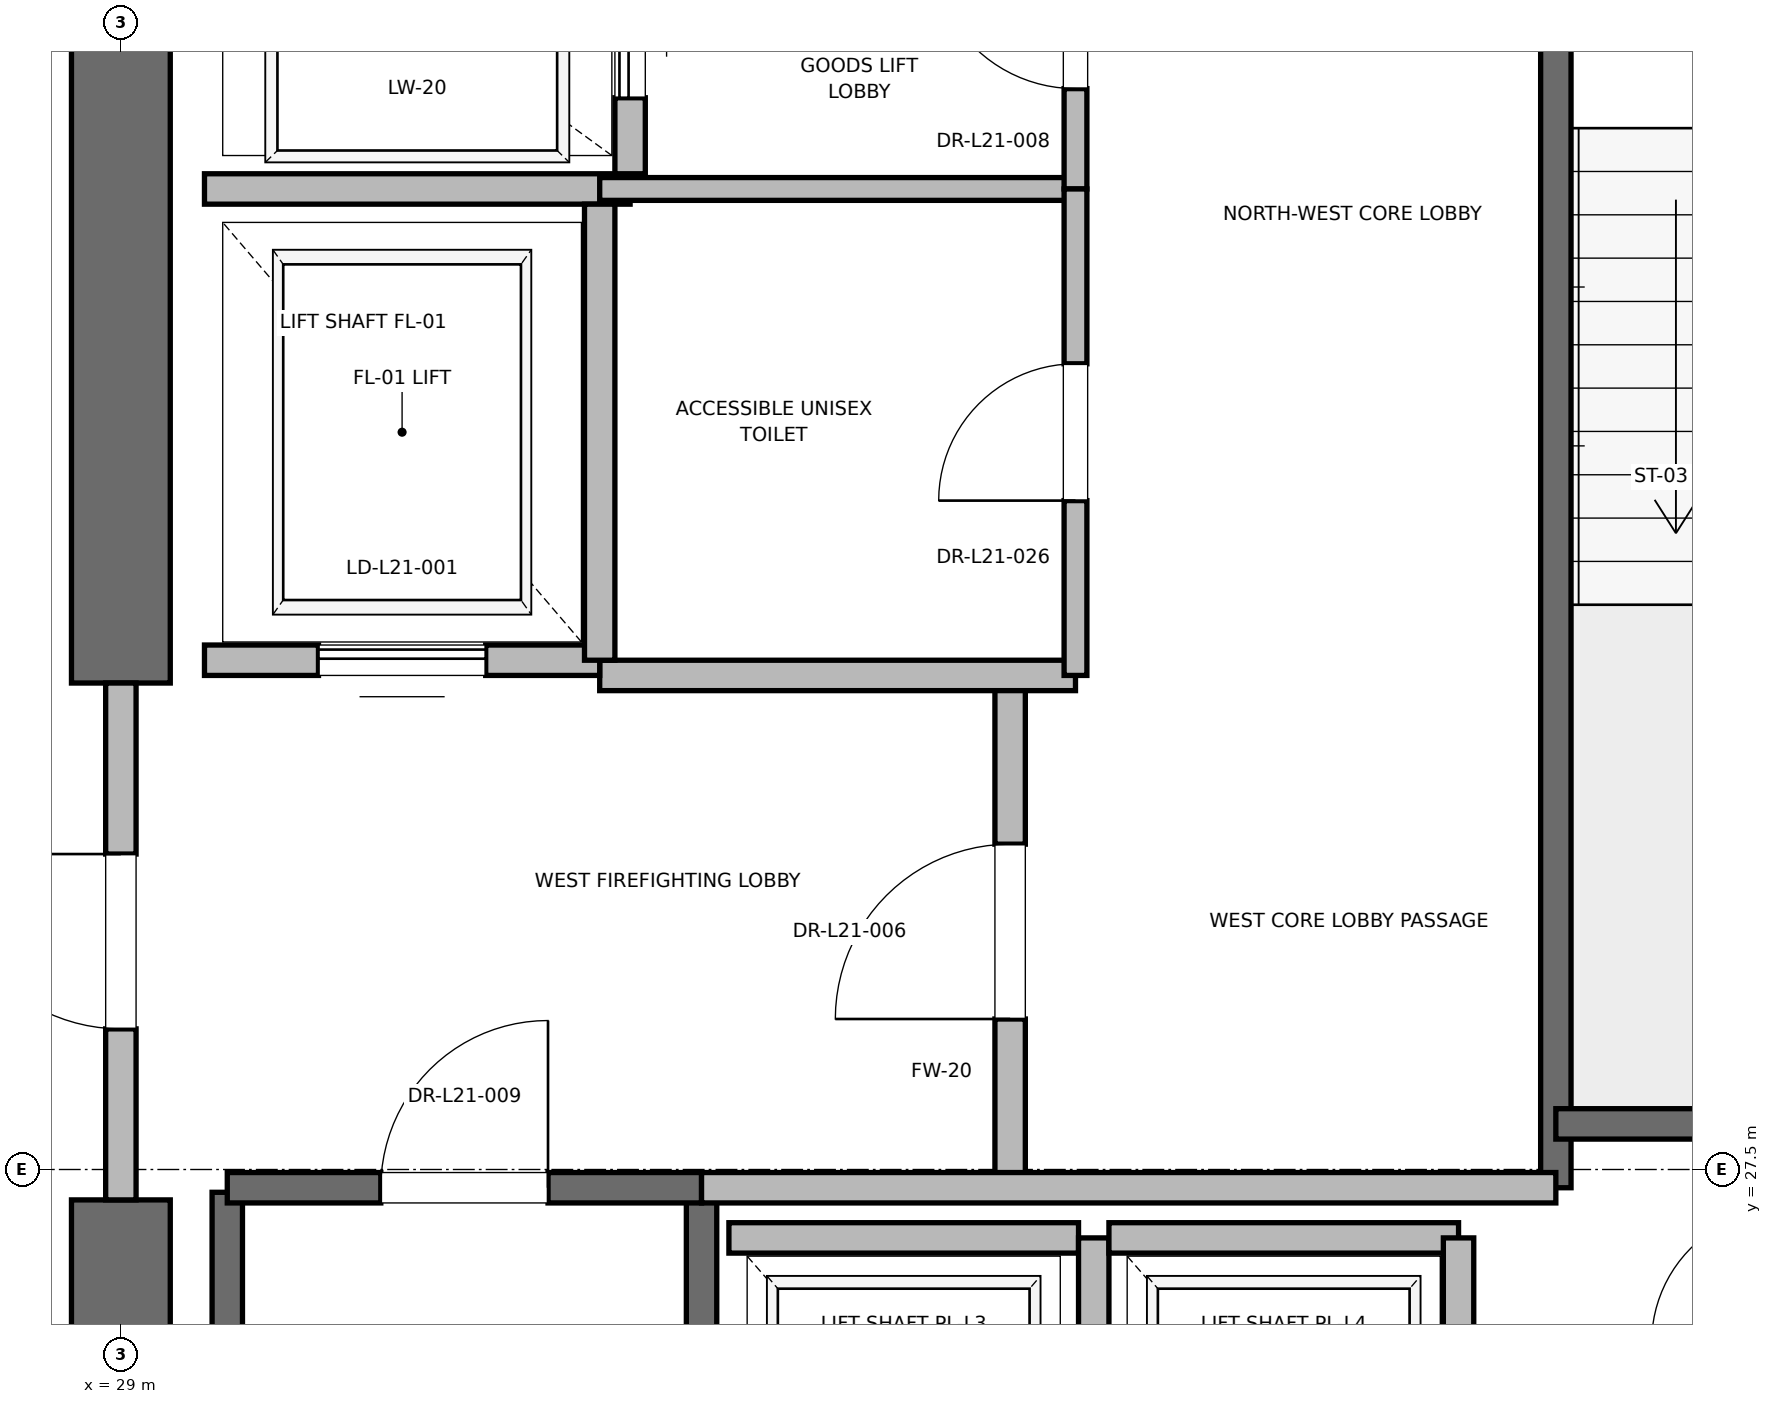
"""IFC4 building model, lengths in metres.
Left out: names, types, materials, properties, quantities, classifications, styles, units other than length and angle.
Written with IfcOpenShell. Run it as: python <this file> out.ifc"""

import sys

from ifc_helpers import new_model, si_unit, direction, frame, frame_2d, origin, place, context, subcontext, project, spatial, rectangle, extrude, element, fill, save


model = new_model("IFC4")
c1 = context("Model", 3, precision=1e-05, world=origin(), true_north=direction((0.0, 1.0)))
c2 = subcontext(c1, "Body", "Model", "MODEL_VIEW")
j1 = project(units=[si_unit("LENGTHUNIT", "METRE"), si_unit("PLANEANGLEUNIT", "RADIAN")], contexts=[c1])
p1 = place(None, origin())
s1 = spatial("IfcSite", under=j1, at=p1, CompositionType="ELEMENT")
p2 = place(p1, origin())
s2 = spatial("IfcBuilding", under=s1, at=p2, CompositionType="ELEMENT")
p3 = place(p2, frame((0.0, 0.0, 91.6)))
s3 = spatial("IfcBuildingStorey", under=s2, at=p3, CompositionType="ELEMENT", Elevation=91.6)
p4 = place(p3, frame((29.0, 18.5, 0.0), z_axis=(0.0, 0.0, 1.0), x_axis=(0.0, 1.0, 0.0)))
e1 = element("IfcWall", 1, at=p4, inside=s3, PredefinedType="SHEAR", context=c2, shape_type="SweptSolid", body=[
    extrude(rectangle(XDim=8.8, YDim=0.65, at=frame_2d((4.4, 0.0))), origin(), (0.0, 0.0, 1.0), 3.76),
])
p5 = place(p3, frame((29.0, 30.7, 0.0), z_axis=(0.0, 0.0, 1.0), x_axis=(0.0, 1.0, 0.0)))
e2 = element("IfcWall", 2, at=p5, inside=s3, PredefinedType="SHEAR", context=c2, shape_type="SweptSolid", body=[
    extrude(rectangle(XDim=5.8, YDim=0.65, at=frame_2d((2.9, 0.0))), origin(), (0.0, 0.0, 1.0), 3.76),
])
p6 = place(p3, frame((29.7, 19.2, 0.0), z_axis=(0.0, 0.0, 1.0), x_axis=(0.0, 1.0, 0.0)))
e3 = element("IfcWall", 3, at=p6, inside=s3, PredefinedType="SOLIDWALL", context=c2, shape_type="SweptSolid", body=[
    extrude(rectangle(XDim=8.15, YDim=0.2, at=frame_2d((4.075, 0.0))), origin(), (0.0, 0.0, 1.0), 3.76),
])
p7 = place(p3, frame((32.82, 18.6, 0.0), z_axis=(0.0, 0.0, 1.0), x_axis=(0.0, 1.0, 0.0)))
e4 = element("IfcWall", 4, at=p7, inside=s3, PredefinedType="SOLIDWALL", context=c2, shape_type="SweptSolid", body=[
    extrude(rectangle(XDim=8.78, YDim=0.2, at=frame_2d((4.39, 0.0))), origin(), (0.0, 0.0, 1.0), 3.76),
])
p8 = place(p3, frame((29.7, 27.38, 0.0), z_axis=(0.0, 0.0, 1.0), x_axis=(1.0, 0.0, 0.0)))
e5 = element("IfcWall", 5, at=p8, inside=s3, PredefinedType="SOLIDWALL", context=c2, shape_type="SweptSolid", body=[
    extrude(rectangle(XDim=3.12, YDim=0.2, at=frame_2d((1.56, 0.0))), origin(), (0.0, 0.0, 1.0), 3.76),
])
p9 = place(p8, frame((1.01, 0.0, 0.0)))
e6 = element("IfcOpeningElement", 6, at=p9, cuts=e5, PredefinedType="OPENING", context=c2, shape_type="SweptSolid", body=[
    extrude(rectangle(XDim=1.1, YDim=2.15, at=frame_2d((0.55, 1.075))), frame((0.0, 0.1, 0.0), z_axis=(0.0, -1.0, 0.0), x_axis=(1.0, 0.0, 0.0)), (0.0, 0.0, 1.0), 0.2),
])
p10 = place(p3, frame((38.44, 27.38, 0.0), z_axis=(0.0, 0.0, 1.0), x_axis=(0.0, 1.0, 0.0)))
e7 = element("IfcWall", 7, at=p10, inside=s3, PredefinedType="SOLIDWALL", context=c2, shape_type="SweptSolid", body=[
    extrude(rectangle(XDim=8.87, YDim=0.2, at=frame_2d((4.435, 0.0))), origin(), (0.0, 0.0, 1.0), 3.76),
])
p11 = place(p3, frame((38.44, 27.8, 0.0), z_axis=(0.0, 0.0, 1.0), x_axis=(1.0, 0.0, 0.0)))
e8 = element("IfcWall", 8, at=p11, inside=s3, PredefinedType="SOLIDWALL", context=c2, shape_type="SweptSolid", body=[
    extrude(rectangle(XDim=3.32, YDim=0.2, at=frame_2d((1.66, 0.0))), origin(), (0.0, 0.0, 1.0), 3.76),
])
p12 = place(p3, frame((34.85, 27.38, 0.0), z_axis=(0.0, 0.0, 1.0), x_axis=(0.0, 1.0, 0.0)))
e9 = element("IfcWall", 9, at=p12, inside=s3, PredefinedType="PARTITIONING", context=c2, shape_type="SweptSolid", body=[
    extrude(rectangle(XDim=3.37, YDim=0.2, at=frame_2d((1.685, 0.0))), origin(), (0.0, 0.0, 1.0), 3.76),
])
p13 = place(p12, frame((1.11, 0.0, 0.0)))
e10 = element("IfcOpeningElement", 10, at=p13, cuts=e9, PredefinedType="OPENING", context=c2, shape_type="SweptSolid", body=[
    extrude(rectangle(XDim=1.15, YDim=2.2, at=frame_2d((0.575, 1.1))), frame((0.0, 0.1, 0.0), z_axis=(0.0, -1.0, 0.0), x_axis=(1.0, 0.0, 0.0)), (0.0, 0.0, 1.0), 0.2),
])
p14 = place(p3, frame((29.0, 27.3, 0.0), z_axis=(0.0, 0.0, 1.0), x_axis=(0.0, 1.0, 0.0)))
e11 = element("IfcWall", 11, at=p14, inside=s3, PredefinedType="PARTITIONING", context=c2, shape_type="SweptSolid", body=[
    extrude(rectangle(XDim=3.4, YDim=0.2, at=frame_2d((1.7, 0.0))), origin(), (0.0, 0.0, 1.0), 2.54),
])
p15 = place(p14, frame((1.125, 0.0, 0.0)))
e12 = element("IfcOpeningElement", 12, at=p15, cuts=e11, PredefinedType="OPENING", context=c2, shape_type="SweptSolid", body=[
    extrude(rectangle(XDim=1.15, YDim=2.2, at=frame_2d((0.575, 1.1))), frame((0.0, 0.1, 0.0), z_axis=(0.0, -1.0, 0.0), x_axis=(1.0, 0.0, 0.0)), (0.0, 0.0, 1.0), 0.2),
])
p16 = place(p3, frame((32.82, 27.38, 0.0), z_axis=(0.0, 0.0, 1.0), x_axis=(1.0, 0.0, 0.0)))
e13 = element("IfcWall", 13, at=p16, inside=s3, PredefinedType="PARTITIONING", context=c2, shape_type="SweptSolid", body=[
    extrude(rectangle(XDim=5.62, YDim=0.2, at=frame_2d((2.81, 0.0))), origin(), (0.0, 0.0, 1.0), 3.76),
])
p17 = place(p3, frame((32.15, 30.75, 0.0), z_axis=(0.0, 0.0, 1.0), x_axis=(1.0, 0.0, 0.0)))
e14 = element("IfcWall", 14, at=p17, inside=s3, PredefinedType="PARTITIONING", context=c2, shape_type="SweptSolid", body=[
    extrude(rectangle(XDim=3.13, YDim=0.2, at=frame_2d((1.565, 0.0))), origin(), (0.0, 0.0, 1.0), 3.76),
])
p18 = place(p3, frame((29.55, 30.85, 0.0), z_axis=(0.0, 0.0, 1.0), x_axis=(1.0, 0.0, 0.0)))
e15 = element("IfcWall", 15, at=p18, inside=s3, PredefinedType="SOLIDWALL", context=c2, shape_type="SweptSolid", body=[
    extrude(rectangle(XDim=2.6, YDim=0.2, at=frame_2d((1.3, 0.0))), origin(), (0.0, 0.0, 1.0), 2.54),
])
p19 = place(p18, frame((0.75, 0.0, 0.0)))
e16 = element("IfcOpeningElement", 16, at=p19, cuts=e15, PredefinedType="OPENING", context=c2, shape_type="SweptSolid", body=[
    extrude(rectangle(XDim=1.1, YDim=2.2, at=frame_2d((0.55, 1.1))), frame((0.0, 0.1, 0.0), z_axis=(0.0, -1.0, 0.0), x_axis=(1.0, 0.0, 0.0)), (0.0, 0.0, 1.0), 0.2),
])
p20 = place(p3, frame((29.55, 33.95, 0.0), z_axis=(0.0, 0.0, 1.0), x_axis=(1.0, 0.0, 0.0)))
e17 = element("IfcWall", 17, at=p20, inside=s3, PredefinedType="SOLIDWALL", context=c2, shape_type="SweptSolid", body=[
    extrude(rectangle(XDim=2.8, YDim=0.2, at=frame_2d((1.4, 0.0))), origin(), (0.0, 0.0, 1.0), 3.76),
])
p21 = place(p3, frame((32.15, 30.85, 0.0), z_axis=(0.0, 0.0, 1.0), x_axis=(0.0, 1.0, 0.0)))
e18 = element("IfcWall", 18, at=p21, inside=s3, PredefinedType="SOLIDWALL", context=c2, shape_type="SweptSolid", body=[
    extrude(rectangle(XDim=3.0, YDim=0.2, at=frame_2d((1.5, 0.0))), origin(), (0.0, 0.0, 1.0), 3.76),
])
p22 = place(p3, frame((32.35, 34.05, 0.0), z_axis=(0.0, 0.0, 1.0), x_axis=(0.0, 1.0, 0.0)))
e19 = element("IfcWall", 19, at=p22, inside=s3, PredefinedType="SOLIDWALL", context=c2, shape_type="SweptSolid", body=[
    extrude(rectangle(XDim=2.1, YDim=0.2, at=frame_2d((1.05, 0.0))), origin(), (0.0, 0.0, 1.0), 3.76),
])
p23 = place(p22, frame((0.5, 0.0, 0.0)))
e20 = element("IfcOpeningElement", 20, at=p23, cuts=e19, PredefinedType="OPENING", context=c2, shape_type="SweptSolid", body=[
    extrude(rectangle(XDim=1.1, YDim=2.2, at=frame_2d((0.55, 1.1))), frame((0.0, 0.1, 0.0), z_axis=(0.0, -1.0, 0.0), x_axis=(1.0, 0.0, 0.0)), (0.0, 0.0, 1.0), 0.2),
])
p24 = place(p3, frame((35.3, 27.05, 0.0), z_axis=(0.0, 0.0, 1.0), x_axis=(-1.0, 0.0, 0.0)))
e21 = element("IfcWall", 21, at=p24, inside=s3, PredefinedType="SOLIDWALL", context=c2, shape_type="SweptSolid", body=[
    extrude(rectangle(XDim=2.3, YDim=0.2, at=frame_2d((1.15, 0.0))), origin(), (0.0, 0.0, 1.0), 3.76),
])
p25 = place(p3, frame((35.4, 24.45, 0.0), z_axis=(0.0, 0.0, 1.0), x_axis=(0.0, 1.0, 0.0)))
e22 = element("IfcWall", 22, at=p25, inside=s3, PredefinedType="SOLIDWALL", context=c2, shape_type="SweptSolid", body=[
    extrude(rectangle(XDim=2.6, YDim=0.2, at=frame_2d((1.3, 0.0))), origin(), (0.0, 0.0, 1.0), 3.76),
])
p26 = place(p3, frame((37.8, 27.05, 0.0), z_axis=(0.0, 0.0, 1.0), x_axis=(-1.0, 0.0, 0.0)))
e23 = element("IfcWall", 23, at=p26, inside=s3, PredefinedType="SOLIDWALL", context=c2, shape_type="SweptSolid", body=[
    extrude(rectangle(XDim=2.3, YDim=0.2, at=frame_2d((1.15, 0.0))), origin(), (0.0, 0.0, 1.0), 3.76),
])
p27 = place(p3, frame((37.8, 24.45, 0.0), z_axis=(0.0, 0.0, 1.0), x_axis=(0.0, 1.0, 0.0)))
e24 = element("IfcWall", 24, at=p27, inside=s3, PredefinedType="SOLIDWALL", context=c2, shape_type="SweptSolid", body=[
    extrude(rectangle(XDim=2.6, YDim=0.2, at=frame_2d((1.3, 0.0))), origin(), (0.0, 0.0, 1.0), 3.76),
])
p28 = place(p3, frame((32.15, 33.95, 0.0), z_axis=(0.0, 0.0, 1.0), x_axis=(1.0, 0.0, 0.0)))
e25 = element("IfcWall", 25, at=p28, inside=s3, PredefinedType="PARTITIONING", context=c2, shape_type="SweptSolid", body=[
    extrude(rectangle(XDim=3.13, YDim=0.15, at=frame_2d((1.565, 0.0))), origin(), (0.0, 0.0, 1.0), 2.85),
])
p29 = place(p3, frame((35.28, 33.95, 0.0), z_axis=(0.0, 0.0, 1.0), x_axis=(0.0, 1.0, 0.0)))
e26 = element("IfcWall", 26, at=p29, inside=s3, PredefinedType="PARTITIONING", context=c2, shape_type="SweptSolid", body=[
    extrude(rectangle(XDim=2.27, YDim=0.15, at=frame_2d((1.135, 0.0))), origin(), (0.0, 0.0, 1.0), 2.54),
])
p30 = place(p29, frame((0.66, 0.0, 0.0)))
e27 = element("IfcOpeningElement", 27, at=p30, cuts=e26, PredefinedType="OPENING", context=c2, shape_type="SweptSolid", body=[
    extrude(rectangle(XDim=0.95, YDim=2.15, at=frame_2d((0.475, 1.075))), frame((0.0, 0.075, 0.0), z_axis=(0.0, -1.0, 0.0), x_axis=(1.0, 0.0, 0.0)), (0.0, 0.0, 1.0), 0.15),
])
p31 = place(p3, frame((35.28, 30.75, 0.0), z_axis=(0.0, 0.0, 1.0), x_axis=(0.0, 1.0, 0.0)))
e28 = element("IfcWall", 28, at=p31, inside=s3, PredefinedType="PARTITIONING", context=c2, shape_type="SweptSolid", body=[
    extrude(rectangle(XDim=3.2, YDim=0.15, at=frame_2d((1.6, 0.0))), origin(), (0.0, 0.0, 1.0), 2.85),
])
p32 = place(p31, frame((1.15, 0.0, 0.0)))
e29 = element("IfcOpeningElement", 29, at=p32, cuts=e28, PredefinedType="OPENING", context=c2, shape_type="SweptSolid", body=[
    extrude(rectangle(XDim=0.9, YDim=2.1, at=frame_2d((0.45, 1.05))), frame((0.0, 0.075, 0.0), z_axis=(0.0, -1.0, 0.0), x_axis=(1.0, 0.0, 0.0)), (0.0, 0.0, 1.0), 0.15),
])
p33 = place(p9, origin())
e30 = element("IfcDoor", 30, at=p33, inside=s3, OperationType="SINGLE_SWING_RIGHT", PredefinedType="DOOR", context=c2, shape_type="SweptSolid", body=[
    extrude(rectangle(XDim=1.1, YDim=2.15, at=frame_2d((0.55, 1.075))), frame((0.0, 0.025, 0.0), z_axis=(0.0, -1.0, 0.0), x_axis=(1.0, 0.0, 0.0)), (0.0, 0.0, 1.0), 0.05),
])
fill(e6, e30)
p34 = place(p13, origin())
e31 = element("IfcDoor", 31, at=p34, inside=s3, OperationType="SINGLE_SWING_LEFT", PredefinedType="DOOR", context=c2, shape_type="SweptSolid", body=[
    extrude(rectangle(XDim=1.15, YDim=2.2, at=frame_2d((0.575, 1.1))), frame((0.0, 0.025, 0.0), z_axis=(0.0, -1.0, 0.0), x_axis=(1.0, 0.0, 0.0)), (0.0, 0.0, 1.0), 0.05),
])
fill(e10, e31)
p35 = place(p15, origin())
e32 = element("IfcDoor", 32, at=p35, inside=s3, OperationType="SINGLE_SWING_RIGHT", PredefinedType="DOOR", context=c2, shape_type="SweptSolid", body=[
    extrude(rectangle(XDim=1.15, YDim=2.2, at=frame_2d((0.575, 1.1))), frame((0.0, 0.025, 0.0), z_axis=(0.0, -1.0, 0.0), x_axis=(1.0, 0.0, 0.0)), (0.0, 0.0, 1.0), 0.05),
])
fill(e12, e32)
p36 = place(p19, origin())
e33 = element("IfcDoor", 33, at=p36, inside=s3, OperationType="SLIDING_TO_RIGHT", PredefinedType="DOOR", context=c2, shape_type="SweptSolid", body=[
    extrude(rectangle(XDim=1.1, YDim=2.2, at=frame_2d((0.55, 1.1))), frame((0.0, 0.025, 0.0), z_axis=(0.0, -1.0, 0.0), x_axis=(1.0, 0.0, 0.0)), (0.0, 0.0, 1.0), 0.05),
])
fill(e16, e33)
p37 = place(p23, origin())
e34 = element("IfcDoor", 34, at=p37, inside=s3, OperationType="SLIDING_TO_RIGHT", PredefinedType="DOOR", context=c2, shape_type="SweptSolid", body=[
    extrude(rectangle(XDim=1.1, YDim=2.2, at=frame_2d((0.55, 1.1))), frame((0.0, 0.025, 0.0), z_axis=(0.0, -1.0, 0.0), x_axis=(1.0, 0.0, 0.0)), (0.0, 0.0, 1.0), 0.05),
])
fill(e20, e34)
p38 = place(p30, origin())
e35 = element("IfcDoor", 35, at=p38, inside=s3, OperationType="SINGLE_SWING_RIGHT", PredefinedType="DOOR", context=c2, shape_type="SweptSolid", body=[
    extrude(rectangle(XDim=0.95, YDim=2.15, at=frame_2d((0.475, 1.075))), frame((0.0, 0.025, 0.0), z_axis=(0.0, -1.0, 0.0), x_axis=(1.0, 0.0, 0.0)), (0.0, 0.0, 1.0), 0.05),
])
fill(e27, e35)
p39 = place(p32, origin())
e36 = element("IfcDoor", 36, at=p39, inside=s3, OperationType="SINGLE_SWING_LEFT", PredefinedType="DOOR", context=c2, shape_type="SweptSolid", body=[
    extrude(rectangle(XDim=0.9, YDim=2.1, at=frame_2d((0.45, 1.05))), frame((0.0, 0.025, 0.0), z_axis=(0.0, -1.0, 0.0), x_axis=(1.0, 0.0, 0.0)), (0.0, 0.0, 1.0), 0.05),
])
fill(e29, e36)
save(model, sys.argv[1])
